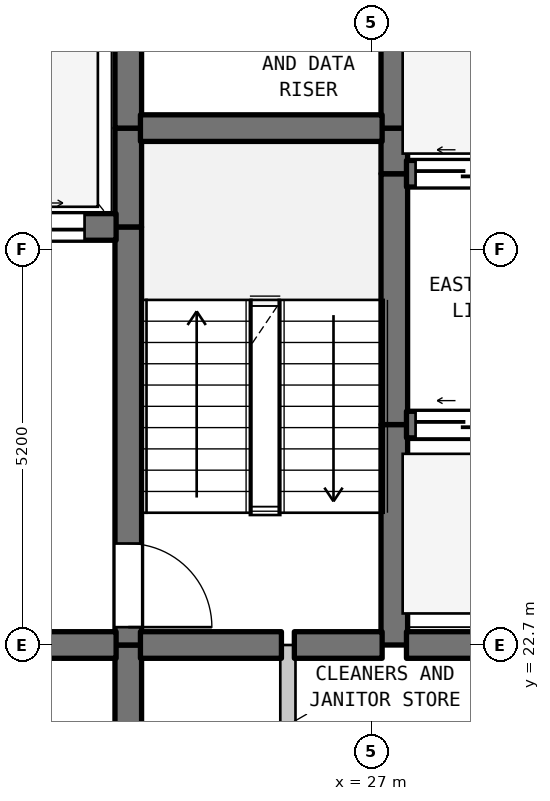
"""IFC4 building model, lengths in metres.
Left out: names, types, materials, properties, quantities, classifications, styles, units other than length and angle.
Written with IfcOpenShell. Run it as: python <this file> out.ifc"""

import sys

from ifc_helpers import new_model, si_unit, direction, frame, frame_2d, origin, place, context, subcontext, project, spatial, rectangle, extrude, element, fill, save


model = new_model("IFC4")
c1 = context("Model", 3, precision=1e-05, world=origin(), true_north=direction((0.0, 1.0)))
c2 = subcontext(c1, "Body", "Model", "MODEL_VIEW")
j1 = project(units=[si_unit("LENGTHUNIT", "METRE"), si_unit("PLANEANGLEUNIT", "RADIAN")], contexts=[c1])
p1 = place(None, origin())
s1 = spatial("IfcSite", under=j1, at=p1, CompositionType="ELEMENT")
p2 = place(p1, origin())
s2 = spatial("IfcBuilding", under=s1, at=p2, CompositionType="ELEMENT")
p3 = place(p2, frame((0.0, 0.0, 105.7)))
s3 = spatial("IfcBuildingStorey", under=s2, at=p3, CompositionType="ELEMENT", Elevation=105.7)
p4 = place(p3, frame((23.8, 19.5, 0.0), z_axis=(0.0, 0.0, 1.0), x_axis=(0.0, 1.0, 0.0)))
e1 = element("IfcWall", 1, at=p4, inside=s3, PredefinedType="SHEAR", context=c2, shape_type="SweptSolid", body=[
    extrude(rectangle(XDim=3.2, YDim=0.35, at=frame_2d((1.6, 0.0))), origin(), (0.0, 0.0, 1.0), 3.385),
])
p5 = place(p3, frame((23.8, 22.7, 0.0), z_axis=(0.0, 0.0, 1.0), x_axis=(0.0, 1.0, 0.0)))
e2 = element("IfcWall", 2, at=p5, inside=s3, PredefinedType="SHEAR", context=c2, shape_type="SweptSolid", body=[
    extrude(rectangle(XDim=5.5, YDim=0.35, at=frame_2d((2.75, 0.0))), origin(), (0.0, 0.0, 1.0), 3.385),
])
p6 = place(p5, frame((0.235, 0.0, 0.0)))
e3 = element("IfcOpeningElement", 3, at=p6, cuts=e2, PredefinedType="OPENING", context=c2, shape_type="SweptSolid", body=[
    extrude(rectangle(XDim=1.1, YDim=2.15, at=frame_2d((0.55, 1.075))), frame((0.0, 0.185, 0.0), z_axis=(0.0, -1.0, 0.0), x_axis=(1.0, 0.0, 0.0)), (0.0, 0.0, 1.0), 0.37),
])
for number, where, z_axis, x_axis in (
    (4, (23.8, 28.2, 0.0), (0.0, 0.0, 1.0), (0.0, 1.0, 0.0)),
    (5, (23.8, 29.5, 0.0), (0.0, 0.0, 1.0), (0.0, 1.0, 0.0)),
):
    element("IfcWall", number, at=place(p3, frame(where, z_axis=z_axis, x_axis=x_axis)), inside=s3, PredefinedType="SHEAR", context=c2, shape_type="SweptSolid", body=[
        extrude(rectangle(XDim=1.3, YDim=0.35, at=frame_2d((0.65, 0.0))), origin(), (0.0, 0.0, 1.0), 3.385),
    ])
p7 = place(p3, frame((25.9, 19.5, 0.0), z_axis=(0.0, 0.0, 1.0), x_axis=(0.0, 1.0, 0.0)))
e6 = element("IfcWall", 6, at=p7, inside=s3, PredefinedType="STANDARD", context=c2, shape_type="SweptSolid", body=[
    extrude(rectangle(XDim=3.2, YDim=0.2, at=frame_2d((1.6, 0.0))), origin(), (0.0, 0.0, 1.0), 3.385),
])
p8 = place(p3, frame((27.3, 22.7, 0.0), z_axis=(0.0, 0.0, 1.0), x_axis=(0.0, 1.0, 0.0)))
e7 = element("IfcWall", 7, at=p8, inside=s3, PredefinedType="SHEAR", context=c2, shape_type="SweptSolid", body=[
    extrude(rectangle(XDim=2.9, YDim=0.35, at=frame_2d((1.45, 0.0))), origin(), (0.0, 0.0, 1.0), 3.385),
])
p9 = place(p3, frame((27.3, 25.6, 0.0), z_axis=(0.0, 0.0, 1.0), x_axis=(0.0, 1.0, 0.0)))
e8 = element("IfcWall", 8, at=p9, inside=s3, PredefinedType="SHEAR", context=c2, shape_type="SweptSolid", body=[
    extrude(rectangle(XDim=3.3, YDim=0.35, at=frame_2d((1.65, 0.0))), origin(), (0.0, 0.0, 1.0), 3.385),
])
p10 = place(p3, frame((27.3, 28.9, 0.0), z_axis=(0.0, 0.0, 1.0), x_axis=(0.0, 1.0, 0.0)))
e9 = element("IfcWall", 9, at=p10, inside=s3, PredefinedType="SHEAR", context=c2, shape_type="SweptSolid", body=[
    extrude(rectangle(XDim=0.6, YDim=0.35, at=frame_2d((0.3, 0.0))), origin(), (0.0, 0.0, 1.0), 3.385),
])
p11 = place(p3, frame((27.3, 29.5, 0.0), z_axis=(0.0, 0.0, 1.0), x_axis=(0.0, 1.0, 0.0)))
e10 = element("IfcWall", 10, at=p11, inside=s3, PredefinedType="SHEAR", context=c2, shape_type="SweptSolid", body=[
    extrude(rectangle(XDim=2.0, YDim=0.35, at=frame_2d((1.0, 0.0))), origin(), (0.0, 0.0, 1.0), 3.385),
])
p12 = place(p3, frame((19.16, 22.7, 0.0), z_axis=(0.0, 0.0, 1.0), x_axis=(1.0, 0.0, 0.0)))
e11 = element("IfcWall", 11, at=p12, inside=s3, PredefinedType="SHEAR", context=c2, shape_type="SweptSolid", body=[
    extrude(rectangle(XDim=4.48, YDim=0.35, at=frame_2d((2.24, 0.0))), origin(), (0.0, 0.0, 1.0), 3.385),
])
p13 = place(p12, frame((1.64, 0.0, 0.0)))
e12 = element("IfcOpeningElement", 12, at=p13, cuts=e11, PredefinedType="OPENING", context=c2, shape_type="SweptSolid", body=[
    extrude(rectangle(XDim=1.2, YDim=2.2, at=frame_2d((0.6, 1.1))), frame((0.0, 0.185, 0.0), z_axis=(0.0, -1.0, 0.0), x_axis=(1.0, 0.0, 0.0)), (0.0, 0.0, 1.0), 0.37),
])
p14 = place(p3, frame((23.96, 22.7, 0.0), z_axis=(0.0, 0.0, 1.0), x_axis=(1.0, 0.0, 0.0)))
e13 = element("IfcWall", 13, at=p14, inside=s3, PredefinedType="SHEAR", context=c2, shape_type="SweptSolid", body=[
    extrude(rectangle(XDim=1.855, YDim=0.35, at=frame_2d((0.927, 0.0))), origin(), (0.0, 0.0, 1.0), 3.385),
])
p15 = place(p3, frame((25.985, 22.7, 0.0), z_axis=(0.0, 0.0, 1.0), x_axis=(1.0, 0.0, 0.0)))
e14 = element("IfcWall", 14, at=p15, inside=s3, PredefinedType="SHEAR", context=c2, shape_type="SweptSolid", body=[
    extrude(rectangle(XDim=1.155, YDim=0.35, at=frame_2d((0.577, 0.0))), origin(), (0.0, 0.0, 1.0), 3.385),
])
p16 = place(p3, frame((27.46, 22.7, 0.0), z_axis=(0.0, 0.0, 1.0), x_axis=(1.0, 0.0, 0.0)))
e15 = element("IfcWall", 15, at=p16, inside=s3, PredefinedType="SHEAR", context=c2, shape_type="SweptSolid", body=[
    extrude(rectangle(XDim=3.18, YDim=0.35, at=frame_2d((1.59, 0.0))), origin(), (0.0, 0.0, 1.0), 3.385),
])
p17 = place(p3, frame((27.46, 25.6, 0.0), z_axis=(0.0, 0.0, 1.0), x_axis=(1.0, 0.0, 0.0)))
e16 = element("IfcWall", 16, at=p17, inside=s3, PredefinedType="SHEAR", context=c2, shape_type="SweptSolid", body=[
    extrude(rectangle(XDim=3.18, YDim=0.35, at=frame_2d((1.59, 0.0))), origin(), (0.0, 0.0, 1.0), 3.385),
])
p18 = place(p17, frame((0.12, 0.0, 0.0)))
e17 = element("IfcOpeningElement", 17, at=p18, cuts=e16, PredefinedType="OPENING", context=c2, shape_type="SweptSolid", body=[
    extrude(rectangle(XDim=1.25, YDim=2.2, at=frame_2d((0.625, 1.1))), frame((0.0, 0.185, 0.0), z_axis=(0.0, -1.0, 0.0), x_axis=(1.0, 0.0, 0.0)), (0.0, 0.0, 1.0), 0.37),
])
p19 = place(p17, frame((1.81, 0.0, 0.0)))
e18 = element("IfcOpeningElement", 18, at=p19, cuts=e16, PredefinedType="OPENING", context=c2, shape_type="SweptSolid", body=[
    extrude(rectangle(XDim=1.25, YDim=2.2, at=frame_2d((0.625, 1.1))), frame((0.0, 0.185, 0.0), z_axis=(0.0, -1.0, 0.0), x_axis=(1.0, 0.0, 0.0)), (0.0, 0.0, 1.0), 0.37),
])
p20 = place(p3, frame((19.16, 28.2, 0.0), z_axis=(0.0, 0.0, 1.0), x_axis=(1.0, 0.0, 0.0)))
e19 = element("IfcWall", 19, at=p20, inside=s3, PredefinedType="SHEAR", context=c2, shape_type="SweptSolid", body=[
    extrude(rectangle(XDim=4.48, YDim=0.35, at=frame_2d((2.24, 0.0))), origin(), (0.0, 0.0, 1.0), 3.385),
])
p21 = place(p20, frame((0.415, 0.0, 0.0)))
e20 = element("IfcOpeningElement", 20, at=p21, cuts=e19, PredefinedType="OPENING", context=c2, shape_type="SweptSolid", body=[
    extrude(rectangle(XDim=1.25, YDim=2.2, at=frame_2d((0.625, 1.1))), frame((0.0, 0.185, 0.0), z_axis=(0.0, -1.0, 0.0), x_axis=(1.0, 0.0, 0.0)), (0.0, 0.0, 1.0), 0.37),
])
p22 = place(p20, frame((2.815, 0.0, 0.0)))
e21 = element("IfcOpeningElement", 21, at=p22, cuts=e19, PredefinedType="OPENING", context=c2, shape_type="SweptSolid", body=[
    extrude(rectangle(XDim=1.25, YDim=2.2, at=frame_2d((0.625, 1.1))), frame((0.0, 0.185, 0.0), z_axis=(0.0, -1.0, 0.0), x_axis=(1.0, 0.0, 0.0)), (0.0, 0.0, 1.0), 0.37),
])
p23 = place(p3, frame((27.46, 28.9, 0.0), z_axis=(0.0, 0.0, 1.0), x_axis=(1.0, 0.0, 0.0)))
e22 = element("IfcWall", 22, at=p23, inside=s3, PredefinedType="SHEAR", context=c2, shape_type="SweptSolid", body=[
    extrude(rectangle(XDim=3.18, YDim=0.35, at=frame_2d((1.59, 0.0))), origin(), (0.0, 0.0, 1.0), 3.385),
])
p24 = place(p23, frame((0.12, 0.0, 0.0)))
e23 = element("IfcOpeningElement", 23, at=p24, cuts=e22, PredefinedType="OPENING", context=c2, shape_type="SweptSolid", body=[
    extrude(rectangle(XDim=1.25, YDim=2.2, at=frame_2d((0.625, 1.1))), frame((0.0, 0.185, 0.0), z_axis=(0.0, -1.0, 0.0), x_axis=(1.0, 0.0, 0.0)), (0.0, 0.0, 1.0), 0.37),
])
p25 = place(p23, frame((1.81, 0.0, 0.0)))
e24 = element("IfcOpeningElement", 24, at=p25, cuts=e22, PredefinedType="OPENING", context=c2, shape_type="SweptSolid", body=[
    extrude(rectangle(XDim=1.25, YDim=2.2, at=frame_2d((0.625, 1.1))), frame((0.0, 0.185, 0.0), z_axis=(0.0, -1.0, 0.0), x_axis=(1.0, 0.0, 0.0)), (0.0, 0.0, 1.0), 0.37),
])
p26 = place(p3, frame((23.96, 29.5, 0.0), z_axis=(0.0, 0.0, 1.0), x_axis=(1.0, 0.0, 0.0)))
e25 = element("IfcWall", 25, at=p26, inside=s3, PredefinedType="SHEAR", context=c2, shape_type="SweptSolid", body=[
    extrude(rectangle(XDim=3.18, YDim=0.35, at=frame_2d((1.59, 0.0))), origin(), (0.0, 0.0, 1.0), 3.385),
])
p27 = place(p6, frame((1.1, 0.0, 0.0), z_axis=(0.0, 0.0, 1.0), x_axis=(-1.0, 0.0, 0.0)))
e26 = element("IfcDoor", 26, at=p27, inside=s3, OperationType="SINGLE_SWING_LEFT", PredefinedType="DOOR", context=c2, shape_type="SweptSolid", body=[
    extrude(rectangle(XDim=1.1, YDim=2.15, at=frame_2d((0.55, 1.075))), frame((0.0, 0.025, 0.0), z_axis=(0.0, -1.0, 0.0), x_axis=(1.0, 0.0, 0.0)), (0.0, 0.0, 1.0), 0.05),
])
fill(e3, e26)
p28 = place(p18, origin())
e27 = element("IfcDoor", 27, at=p28, inside=s3, OperationType="DOUBLE_DOOR_SLIDING", PredefinedType="DOOR", context=c2, shape_type="SweptSolid", body=[
    extrude(rectangle(XDim=1.25, YDim=2.2, at=frame_2d((0.625, 1.1))), frame((0.0, 0.025, 0.0), z_axis=(0.0, -1.0, 0.0), x_axis=(1.0, 0.0, 0.0)), (0.0, 0.0, 1.0), 0.05),
])
fill(e17, e27)
p29 = place(p22, origin())
e28 = element("IfcDoor", 28, at=p29, inside=s3, OperationType="DOUBLE_DOOR_SLIDING", PredefinedType="DOOR", context=c2, shape_type="SweptSolid", body=[
    extrude(rectangle(XDim=1.25, YDim=2.2, at=frame_2d((0.625, 1.1))), frame((0.0, 0.025, 0.0), z_axis=(0.0, -1.0, 0.0), x_axis=(1.0, 0.0, 0.0)), (0.0, 0.0, 1.0), 0.05),
])
fill(e21, e28)
p30 = place(p24, origin())
e29 = element("IfcDoor", 29, at=p30, inside=s3, OperationType="DOUBLE_DOOR_SLIDING", PredefinedType="DOOR", context=c2, shape_type="SweptSolid", body=[
    extrude(rectangle(XDim=1.25, YDim=2.2, at=frame_2d((0.625, 1.1))), frame((0.0, 0.025, 0.0), z_axis=(0.0, -1.0, 0.0), x_axis=(1.0, 0.0, 0.0)), (0.0, 0.0, 1.0), 0.05),
])
fill(e23, e29)
save(model, sys.argv[1])
